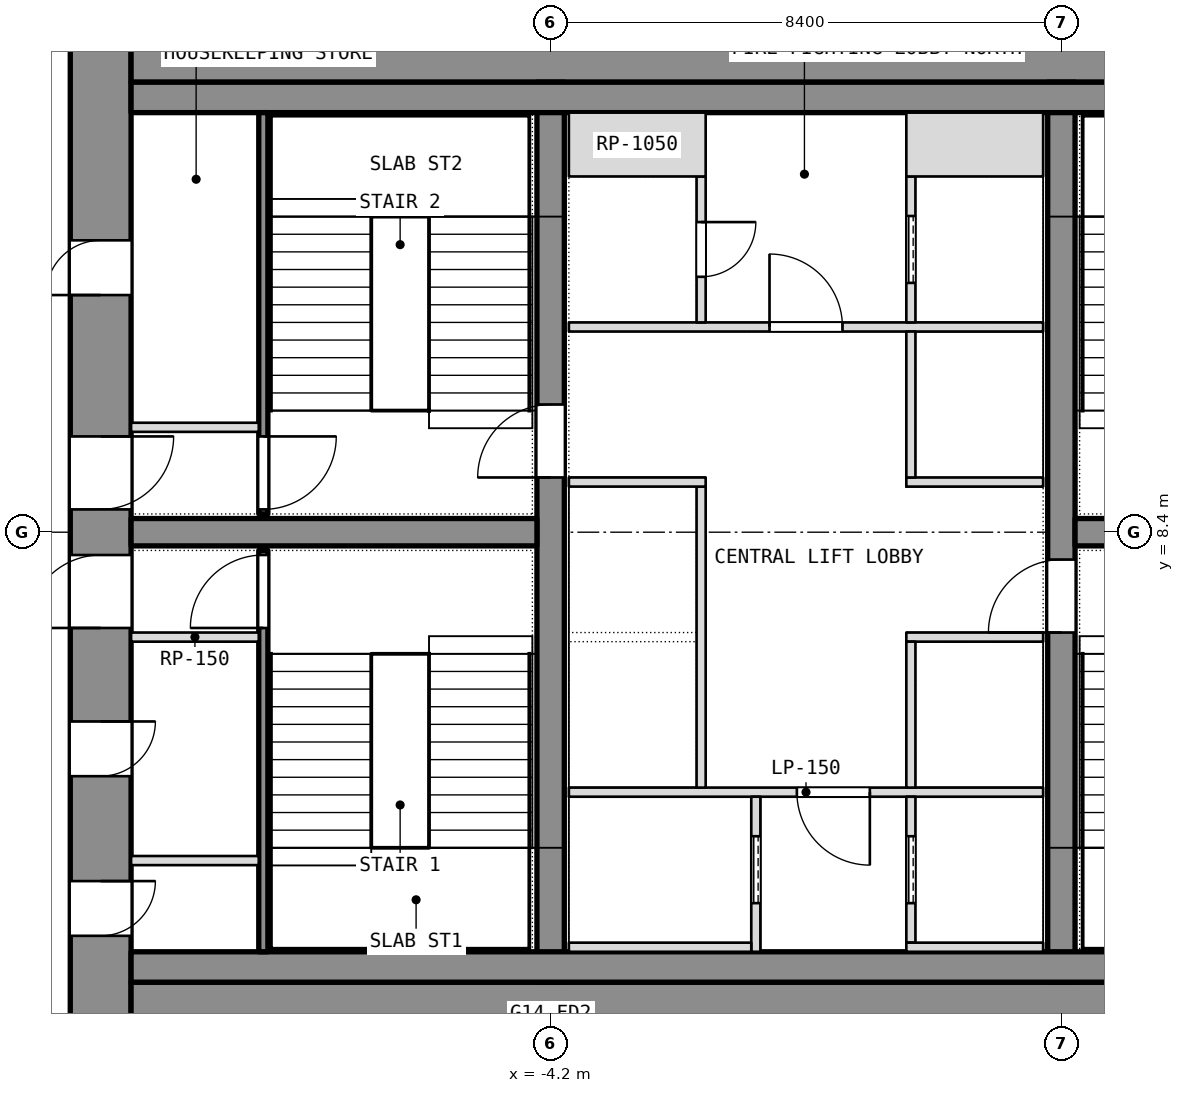
"""IFC4 building model, lengths in metres.
Left out: names, types, materials, properties, quantities, classifications, styles, units other than length and angle.
Written with IfcOpenShell. Run it as: python <this file> out.ifc"""

import sys

from ifc_helpers import new_model, si_unit, direction, frame, frame_2d, origin, place, context, subcontext, project, spatial, rectangle, extrude, element, fill, save


model = new_model("IFC4")
c1 = context("Model", 3, precision=1e-05, world=origin(), true_north=direction((0.0, 1.0)))
c2 = subcontext(c1, "Body", "Model", "MODEL_VIEW")
j1 = project(units=[si_unit("LENGTHUNIT", "METRE"), si_unit("PLANEANGLEUNIT", "RADIAN")], contexts=[c1])
p1 = place(None, origin())
s1 = spatial("IfcSite", under=j1, at=p1, CompositionType="ELEMENT")
p2 = place(p1, origin())
s2 = spatial("IfcBuilding", under=s1, at=p2, CompositionType="ELEMENT")
p3 = place(p2, frame((0.0, 0.0, 158.9)))
s3 = spatial("IfcBuildingStorey", under=s2, at=p3, CompositionType="ELEMENT", Elevation=158.9)
p4 = place(p3, frame((-11.6, 0.0, 0.0), z_axis=(0.0, 0.0, 1.0), x_axis=(0.0, 1.0, 0.0)))
e1 = element("IfcWall", 1, at=p4, inside=s3, PredefinedType="SHEAR", context=c2, shape_type="SweptSolid", body=[
    extrude(rectangle(XDim=16.8, YDim=1.0, at=frame_2d((8.4, 0.0))), origin(), (0.0, 0.0, 1.0), 3.6),
])
p5 = place(p4, frame((1.762, 0.0, 0.0)))
e2 = element("IfcOpeningElement", 2, at=p5, cuts=e1, PredefinedType="OPENING", context=c2, shape_type="SweptSolid", body=[
    extrude(rectangle(XDim=0.9, YDim=2.1, at=frame_2d((0.45, 1.05))), frame((0.0, 0.5, 0.0), z_axis=(0.0, -1.0, 0.0), x_axis=(1.0, 0.0, 0.0)), (0.0, 0.0, 1.0), 1.0),
])
p6 = place(p4, frame((4.387, 0.0, 0.0)))
e3 = element("IfcOpeningElement", 3, at=p6, cuts=e1, PredefinedType="OPENING", context=c2, shape_type="SweptSolid", body=[
    extrude(rectangle(XDim=0.9, YDim=2.1, at=frame_2d((0.45, 1.05))), frame((0.0, 0.5, 0.0), z_axis=(0.0, -1.0, 0.0), x_axis=(1.0, 0.0, 0.0)), (0.0, 0.0, 1.0), 1.0),
])
p7 = place(p4, frame((6.825, 0.0, 0.0)))
e4 = element("IfcOpeningElement", 4, at=p7, cuts=e1, PredefinedType="OPENING", context=c2, shape_type="SweptSolid", body=[
    extrude(rectangle(XDim=1.2, YDim=2.1, at=frame_2d((0.6, 1.05))), frame((0.0, 0.5, 0.0), z_axis=(0.0, -1.0, 0.0), x_axis=(1.0, 0.0, 0.0)), (0.0, 0.0, 1.0), 1.0),
])
p8 = place(p4, frame((12.3, 0.0, 0.0)))
e5 = element("IfcOpeningElement", 5, at=p8, cuts=e1, PredefinedType="OPENING", context=c2, shape_type="SweptSolid", body=[
    extrude(rectangle(XDim=0.9, YDim=2.1, at=frame_2d((0.45, 1.05))), frame((0.0, 0.5, 0.0), z_axis=(0.0, -1.0, 0.0), x_axis=(1.0, 0.0, 0.0)), (0.0, 0.0, 1.0), 1.0),
])
p9 = place(p4, frame((8.775, 0.0, 0.0)))
e6 = element("IfcOpeningElement", 6, at=p9, cuts=e1, PredefinedType="OPENING", context=c2, shape_type="SweptSolid", body=[
    extrude(rectangle(XDim=1.2, YDim=2.1, at=frame_2d((0.6, 1.05))), frame((0.0, 0.5, 0.0), z_axis=(0.0, -1.0, 0.0), x_axis=(1.0, 0.0, 0.0)), (0.0, 0.0, 1.0), 1.0),
])
for number, where, z_axis, x_axis in (
    (7, (-11.1, 0.5, 0.0), (0.0, 0.0, 1.0), (1.0, 0.0, 0.0)),
    (8, (-11.1, 16.3, 0.0), (0.0, 0.0, 1.0), (1.0, 0.0, 0.0)),
):
    element("IfcWall", number, at=place(p3, frame(where, z_axis=z_axis, x_axis=x_axis)), inside=s3, PredefinedType="SHEAR", context=c2, shape_type="SweptSolid", body=[
        extrude(rectangle(XDim=22.2, YDim=1.0, at=frame_2d((11.1, 0.0))), origin(), (0.0, 0.0, 1.0), 3.6),
    ])
p10 = place(p3, frame((-4.2, 1.0, 0.0), z_axis=(0.0, 0.0, 1.0), x_axis=(0.0, 1.0, 0.0)))
e9 = element("IfcWall", 9, at=p10, inside=s3, PredefinedType="SHEAR", context=c2, shape_type="SweptSolid", body=[
    extrude(rectangle(XDim=14.8, YDim=0.45, at=frame_2d((7.4, 0.0))), origin(), (0.0, 0.0, 1.0), 3.6),
])
p11 = place(p10, frame((8.3, 0.0, 0.0)))
e10 = element("IfcOpeningElement", 10, at=p11, cuts=e9, PredefinedType="OPENING", context=c2, shape_type="SweptSolid", body=[
    extrude(rectangle(XDim=1.2, YDim=2.1, at=frame_2d((0.6, 1.05))), frame((0.0, 0.225, 0.0), z_axis=(0.0, -1.0, 0.0), x_axis=(1.0, 0.0, 0.0)), (0.0, 0.0, 1.0), 0.45),
])
p12 = place(p3, frame((4.2, 1.0, 0.0), z_axis=(0.0, 0.0, 1.0), x_axis=(0.0, 1.0, 0.0)))
e11 = element("IfcWall", 11, at=p12, inside=s3, PredefinedType="SHEAR", context=c2, shape_type="SweptSolid", body=[
    extrude(rectangle(XDim=14.8, YDim=0.45, at=frame_2d((7.4, 0.0))), origin(), (0.0, 0.0, 1.0), 3.6),
])
p13 = place(p12, frame((5.75, 0.0, 0.0)))
e12 = element("IfcOpeningElement", 12, at=p13, cuts=e11, PredefinedType="OPENING", context=c2, shape_type="SweptSolid", body=[
    extrude(rectangle(XDim=1.2, YDim=2.1, at=frame_2d((0.6, 1.05))), frame((0.0, 0.225, 0.0), z_axis=(0.0, -1.0, 0.0), x_axis=(1.0, 0.0, 0.0)), (0.0, 0.0, 1.0), 0.45),
])
for number, where, z_axis, x_axis in (
    (13, (-11.1, 8.4, 0.0), (0.0, 0.0, 1.0), (1.0, 0.0, 0.0)),
    (14, (4.425, 8.4, 0.0), (0.0, 0.0, 1.0), (1.0, 0.0, 0.0)),
):
    element("IfcWall", number, at=place(p3, frame(where, z_axis=z_axis, x_axis=x_axis)), inside=s3, PredefinedType="SHEAR", context=c2, shape_type="SweptSolid", body=[
        extrude(rectangle(XDim=6.675, YDim=0.45, at=frame_2d((3.337, 0.0))), origin(), (0.0, 0.0, 1.0), 3.6),
    ])
for number, where, z_axis, x_axis in (
    (15, (-11.1, 1.25, 0.0), (0.0, 0.0, 1.0), (1.0, 0.0, 0.0)),
    (16, (-11.1, 15.55, 0.0), (0.0, 0.0, 1.0), (1.0, 0.0, 0.0)),
):
    element("IfcWall", number, at=place(p3, frame(where, z_axis=z_axis, x_axis=x_axis)), inside=s3, PredefinedType="PARTITIONING", context=c2, shape_type="SweptSolid", body=[
        extrude(rectangle(XDim=22.2, YDim=0.5, at=frame_2d((11.1, 0.0))), origin(), (0.0, 0.0, 1.0), 3.34),
    ])
p14 = place(p3, frame((-8.925, 1.5, 0.0), z_axis=(0.0, 0.0, 1.0), x_axis=(0.0, 1.0, 0.0)))
e17 = element("IfcWall", 17, at=p14, inside=s3, PredefinedType="SHEAR", context=c2, shape_type="SweptSolid", body=[
    extrude(rectangle(XDim=6.6, YDim=0.15, at=frame_2d((3.3, 0.0))), origin(), (0.0, 0.0, 1.0), 3.34),
])
p15 = place(p14, frame((5.325, 0.0, 0.0)))
e18 = element("IfcOpeningElement", 18, at=p15, cuts=e17, PredefinedType="OPENING", context=c2, shape_type="SweptSolid", body=[
    extrude(rectangle(XDim=1.2, YDim=2.1, at=frame_2d((0.6, 1.05))), frame((0.0, 0.075, 0.0), z_axis=(0.0, -1.0, 0.0), x_axis=(1.0, 0.0, 0.0)), (0.0, 0.0, 1.0), 0.15),
])
for number, where, z_axis, x_axis in (
    (19, (-11.1, 6.675, 0.0), (0.0, 0.0, 1.0), (1.0, 0.0, 0.0)),
    (20, (-11.1, 3.0, 0.0), (0.0, 0.0, 1.0), (1.0, 0.0, 0.0)),
):
    element("IfcWall", number, at=place(p3, frame(where, z_axis=z_axis, x_axis=x_axis)), inside=s3, PredefinedType="PARTITIONING", context=c2, shape_type="SweptSolid", body=[
        extrude(rectangle(XDim=2.1, YDim=0.15, at=frame_2d((1.05, 0.0))), origin(), (0.0, 0.0, 1.0), 3.34),
    ])
p16 = place(p3, frame((-8.925, 8.7, 0.0), z_axis=(0.0, 0.0, 1.0), x_axis=(0.0, 1.0, 0.0)))
e21 = element("IfcWall", 21, at=p16, inside=s3, PredefinedType="SHEAR", context=c2, shape_type="SweptSolid", body=[
    extrude(rectangle(XDim=6.6, YDim=0.15, at=frame_2d((3.3, 0.0))), origin(), (0.0, 0.0, 1.0), 3.34),
])
p17 = place(p16, frame((0.075, 0.0, 0.0)))
e22 = element("IfcOpeningElement", 22, at=p17, cuts=e21, PredefinedType="OPENING", context=c2, shape_type="SweptSolid", body=[
    extrude(rectangle(XDim=1.2, YDim=2.1, at=frame_2d((0.6, 1.05))), frame((0.0, 0.075, 0.0), z_axis=(0.0, -1.0, 0.0), x_axis=(1.0, 0.0, 0.0)), (0.0, 0.0, 1.0), 0.15),
])
p18 = place(p3, frame((-11.1, 10.125, 0.0), z_axis=(0.0, 0.0, 1.0), x_axis=(1.0, 0.0, 0.0)))
e23 = element("IfcWall", 23, at=p18, inside=s3, PredefinedType="PARTITIONING", context=c2, shape_type="SweptSolid", body=[
    extrude(rectangle(XDim=2.1, YDim=0.15, at=frame_2d((1.05, 0.0))), origin(), (0.0, 0.0, 1.0), 3.34),
])
p19 = place(p3, frame((-3.9, 4.125, 0.0), z_axis=(0.0, 0.0, 1.0), x_axis=(1.0, 0.0, 0.0)))
e24 = element("IfcWall", 24, at=p19, inside=s3, PredefinedType="PARTITIONING", context=c2, shape_type="SweptSolid", body=[
    extrude(rectangle(XDim=7.8, YDim=0.15, at=frame_2d((3.9, 0.0))), origin(), (0.0, 0.0, 1.0), 3.34),
])
p20 = place(p19, frame((3.75, 0.0, 0.0)))
e25 = element("IfcOpeningElement", 25, at=p20, cuts=e24, PredefinedType="OPENING", context=c2, shape_type="SweptSolid", body=[
    extrude(rectangle(XDim=1.2, YDim=2.1, at=frame_2d((0.6, 1.05))), frame((0.0, 0.075, 0.0), z_axis=(0.0, -1.0, 0.0), x_axis=(1.0, 0.0, 0.0)), (0.0, 0.0, 1.0), 0.15),
])
p21 = place(p3, frame((-3.9, 11.775, 0.0), z_axis=(0.0, 0.0, 1.0), x_axis=(1.0, 0.0, 0.0)))
e26 = element("IfcWall", 26, at=p21, inside=s3, PredefinedType="PARTITIONING", context=c2, shape_type="SweptSolid", body=[
    extrude(rectangle(XDim=7.8, YDim=0.15, at=frame_2d((3.9, 0.0))), origin(), (0.0, 0.0, 1.0), 3.34),
])
p22 = place(p21, frame((3.3, 0.0, 0.0)))
e27 = element("IfcOpeningElement", 27, at=p22, cuts=e26, PredefinedType="OPENING", context=c2, shape_type="SweptSolid", body=[
    extrude(rectangle(XDim=1.2, YDim=2.1, at=frame_2d((0.6, 1.05))), frame((0.0, 0.075, 0.0), z_axis=(0.0, -1.0, 0.0), x_axis=(1.0, 0.0, 0.0)), (0.0, 0.0, 1.0), 0.15),
])
p23 = place(p3, frame((-0.825, 1.5, 0.0), z_axis=(0.0, 0.0, 1.0), x_axis=(0.0, 1.0, 0.0)))
e28 = element("IfcWall", 28, at=p23, inside=s3, PredefinedType="SHEAR", context=c2, shape_type="SweptSolid", body=[
    extrude(rectangle(XDim=2.55, YDim=0.15, at=frame_2d((1.275, 0.0))), origin(), (0.0, 0.0, 1.0), 3.6),
])
p24 = place(p23, frame((0.8, 0.0, 0.0)))
e29 = element("IfcOpeningElement", 29, at=p24, cuts=e28, PredefinedType="OPENING", context=c2, shape_type="SweptSolid", body=[
    extrude(rectangle(XDim=1.1, YDim=2.1, at=frame_2d((0.55, 1.05))), frame((0.0, 0.075, 0.0), z_axis=(0.0, -1.0, 0.0), x_axis=(1.0, 0.0, 0.0)), (0.0, 0.0, 1.0), 0.15),
])
p25 = place(p3, frame((-3.9, 1.575, 0.0), z_axis=(0.0, 0.0, 1.0), x_axis=(1.0, 0.0, 0.0)))
e30 = element("IfcWall", 30, at=p25, inside=s3, PredefinedType="SHEAR", context=c2, shape_type="SweptSolid", body=[
    extrude(rectangle(XDim=3.0, YDim=0.15, at=frame_2d((1.5, 0.0))), origin(), (0.0, 0.0, 1.0), 3.6),
])
p26 = place(p3, frame((-1.725, 4.2, 0.0), z_axis=(0.0, 0.0, 1.0), x_axis=(0.0, 1.0, 0.0)))
e31 = element("IfcWall", 31, at=p26, inside=s3, PredefinedType="SHEAR", context=c2, shape_type="SweptSolid", body=[
    extrude(rectangle(XDim=4.95, YDim=0.15, at=frame_2d((2.475, 0.0))), origin(), (0.0, 0.0, 1.0), 3.6),
])
p27 = place(p3, frame((-3.9, 9.225, 0.0), z_axis=(0.0, 0.0, 1.0), x_axis=(1.0, 0.0, 0.0)))
e32 = element("IfcWall", 32, at=p27, inside=s3, PredefinedType="SHEAR", context=c2, shape_type="SweptSolid", body=[
    extrude(rectangle(XDim=2.25, YDim=0.15, at=frame_2d((1.125, 0.0))), origin(), (0.0, 0.0, 1.0), 3.6),
])
p28 = place(p3, frame((-1.725, 11.85, 0.0), z_axis=(0.0, 0.0, 1.0), x_axis=(0.0, 1.0, 0.0)))
e33 = element("IfcWall", 33, at=p28, inside=s3, PredefinedType="PARTITIONING", context=c2, shape_type="SweptSolid", body=[
    extrude(rectangle(XDim=2.4, YDim=0.15, at=frame_2d((1.2, 0.0))), origin(), (0.0, 0.0, 1.0), 3.34),
])
p29 = place(p28, frame((0.75, 0.0, 0.0)))
e34 = element("IfcOpeningElement", 34, at=p29, cuts=e33, PredefinedType="OPENING", context=c2, shape_type="SweptSolid", body=[
    extrude(rectangle(XDim=0.9, YDim=2.1, at=frame_2d((0.45, 1.05))), frame((0.0, 0.075, 0.0), z_axis=(0.0, -1.0, 0.0), x_axis=(1.0, 0.0, 0.0)), (0.0, 0.0, 1.0), 0.15),
])
p30 = place(p3, frame((-3.9, 14.775, 0.0), z_axis=(0.0, 0.0, 1.0), x_axis=(1.0, 0.0, 0.0)))
e35 = element("IfcWall", 35, at=p30, inside=s3, PredefinedType="PARTITIONING", context=c2, shape_type="SweptSolid", body=[
    extrude(rectangle(XDim=2.25, YDim=1.05, at=frame_2d((1.125, 0.0))), origin(), (0.0, 0.0, 1.0), 3.34),
])
p31 = place(p3, frame((1.725, 1.65, 0.0), z_axis=(0.0, 0.0, 1.0), x_axis=(0.0, 1.0, 0.0)))
e36 = element("IfcWall", 36, at=p31, inside=s3, PredefinedType="SHEAR", context=c2, shape_type="SweptSolid", body=[
    extrude(rectangle(XDim=2.4, YDim=0.15, at=frame_2d((1.2, 0.0))), origin(), (0.0, 0.0, 1.0), 3.6),
])
p32 = place(p31, frame((0.65, 0.0, 0.0)))
e37 = element("IfcOpeningElement", 37, at=p32, cuts=e36, PredefinedType="OPENING", context=c2, shape_type="SweptSolid", body=[
    extrude(rectangle(XDim=1.1, YDim=2.1, at=frame_2d((0.55, 1.05))), frame((0.0, 0.075, 0.0), z_axis=(0.0, -1.0, 0.0), x_axis=(1.0, 0.0, 0.0)), (0.0, 0.0, 1.0), 0.15),
])
p33 = place(p3, frame((1.65, 1.575, 0.0), z_axis=(0.0, 0.0, 1.0), x_axis=(1.0, 0.0, 0.0)))
e38 = element("IfcWall", 38, at=p33, inside=s3, PredefinedType="SHEAR", context=c2, shape_type="SweptSolid", body=[
    extrude(rectangle(XDim=2.25, YDim=0.15, at=frame_2d((1.125, 0.0))), origin(), (0.0, 0.0, 1.0), 3.6),
])
p34 = place(p3, frame((1.725, 11.85, 0.0), z_axis=(0.0, 0.0, 1.0), x_axis=(0.0, 1.0, 0.0)))
e39 = element("IfcWall", 39, at=p34, inside=s3, PredefinedType="SHEAR", context=c2, shape_type="SweptSolid", body=[
    extrude(rectangle(XDim=2.4, YDim=0.15, at=frame_2d((1.2, 0.0))), origin(), (0.0, 0.0, 1.0), 3.6),
])
p35 = place(p34, frame((0.65, 0.0, 0.0)))
e40 = element("IfcOpeningElement", 40, at=p35, cuts=e39, PredefinedType="OPENING", context=c2, shape_type="SweptSolid", body=[
    extrude(rectangle(XDim=1.1, YDim=2.1, at=frame_2d((0.55, 1.05))), frame((0.0, 0.075, 0.0), z_axis=(0.0, -1.0, 0.0), x_axis=(1.0, 0.0, 0.0)), (0.0, 0.0, 1.0), 0.15),
])
p36 = place(p3, frame((1.65, 14.775, 0.0), z_axis=(0.0, 0.0, 1.0), x_axis=(1.0, 0.0, 0.0)))
e41 = element("IfcWall", 41, at=p36, inside=s3, PredefinedType="SHEAR", context=c2, shape_type="SweptSolid", body=[
    extrude(rectangle(XDim=2.25, YDim=1.05, at=frame_2d((1.125, 0.0))), origin(), (0.0, 0.0, 1.0), 3.6),
])
for number, where, z_axis, x_axis in (
    (42, (1.65, 6.675, 0.0), (0.0, 0.0, 1.0), (1.0, 0.0, 0.0)),
    (43, (1.65, 9.225, 0.0), (0.0, 0.0, 1.0), (1.0, 0.0, 0.0)),
):
    element("IfcWall", number, at=place(p3, frame(where, z_axis=z_axis, x_axis=x_axis)), inside=s3, PredefinedType="SHEAR", context=c2, shape_type="SweptSolid", body=[
        extrude(rectangle(XDim=2.25, YDim=0.15, at=frame_2d((1.125, 0.0))), origin(), (0.0, 0.0, 1.0), 3.6),
    ])
p37 = place(p3, frame((1.725, 4.2, 0.0), z_axis=(0.0, 0.0, 1.0), x_axis=(0.0, 1.0, 0.0)))
e44 = element("IfcWall", 44, at=p37, inside=s3, PredefinedType="SHEAR", context=c2, shape_type="SweptSolid", body=[
    extrude(rectangle(XDim=2.4, YDim=0.15, at=frame_2d((1.2, 0.0))), origin(), (0.0, 0.0, 1.0), 3.6),
])
p38 = place(p3, frame((1.725, 9.3, 0.0), z_axis=(0.0, 0.0, 1.0), x_axis=(0.0, 1.0, 0.0)))
e45 = element("IfcWall", 45, at=p38, inside=s3, PredefinedType="SHEAR", context=c2, shape_type="SweptSolid", body=[
    extrude(rectangle(XDim=2.4, YDim=0.15, at=frame_2d((1.2, 0.0))), origin(), (0.0, 0.0, 1.0), 3.6),
])
p39 = place(p5, origin())
e46 = element("IfcDoor", 46, at=p39, inside=s3, OperationType="SINGLE_SWING_LEFT", PredefinedType="DOOR", context=c2, shape_type="SweptSolid", body=[
    extrude(rectangle(XDim=0.9, YDim=2.1, at=frame_2d((0.45, 1.05))), frame((0.0, 0.025, 0.0), z_axis=(0.0, -1.0, 0.0), x_axis=(1.0, 0.0, 0.0)), (0.0, 0.0, 1.0), 0.05),
])
fill(e2, e46)
p40 = place(p6, origin())
e47 = element("IfcDoor", 47, at=p40, inside=s3, OperationType="SINGLE_SWING_LEFT", PredefinedType="DOOR", context=c2, shape_type="SweptSolid", body=[
    extrude(rectangle(XDim=0.9, YDim=2.1, at=frame_2d((0.45, 1.05))), frame((0.0, 0.025, 0.0), z_axis=(0.0, -1.0, 0.0), x_axis=(1.0, 0.0, 0.0)), (0.0, 0.0, 1.0), 0.05),
])
fill(e3, e47)
p41 = place(p7, origin())
e48 = element("IfcDoor", 48, at=p41, inside=s3, OperationType="SINGLE_SWING_LEFT", PredefinedType="DOOR", context=c2, shape_type="SweptSolid", body=[
    extrude(rectangle(XDim=1.2, YDim=2.1, at=frame_2d((0.6, 1.05))), frame((0.0, 0.025, 0.0), z_axis=(0.0, -1.0, 0.0), x_axis=(1.0, 0.0, 0.0)), (0.0, 0.0, 1.0), 0.05),
])
fill(e4, e48)
p42 = place(p15, origin())
e49 = element("IfcDoor", 49, at=p42, inside=s3, OperationType="SINGLE_SWING_LEFT", PredefinedType="DOOR", context=c2, shape_type="SweptSolid", body=[
    extrude(rectangle(XDim=1.2, YDim=2.1, at=frame_2d((0.6, 1.05))), frame((0.0, 0.025, 0.0), z_axis=(0.0, -1.0, 0.0), x_axis=(1.0, 0.0, 0.0)), (0.0, 0.0, 1.0), 0.05),
])
fill(e18, e49)
p43 = place(p8, origin())
e50 = element("IfcDoor", 50, at=p43, inside=s3, OperationType="SINGLE_SWING_LEFT", PredefinedType="DOOR", context=c2, shape_type="SweptSolid", body=[
    extrude(rectangle(XDim=0.9, YDim=2.1, at=frame_2d((0.45, 1.05))), frame((0.0, 0.025, 0.0), z_axis=(0.0, -1.0, 0.0), x_axis=(1.0, 0.0, 0.0)), (0.0, 0.0, 1.0), 0.05),
])
fill(e5, e50)
p44 = place(p9, origin())
e51 = element("IfcDoor", 51, at=p44, inside=s3, OperationType="SINGLE_SWING_LEFT", PredefinedType="DOOR", context=c2, shape_type="SweptSolid", body=[
    extrude(rectangle(XDim=1.2, YDim=2.1, at=frame_2d((0.6, 1.05))), frame((0.0, 0.025, 0.0), z_axis=(0.0, -1.0, 0.0), x_axis=(1.0, 0.0, 0.0)), (0.0, 0.0, 1.0), 0.05),
])
fill(e6, e51)
p45 = place(p17, origin())
e52 = element("IfcDoor", 52, at=p45, inside=s3, OperationType="SINGLE_SWING_LEFT", PredefinedType="DOOR", context=c2, shape_type="SweptSolid", body=[
    extrude(rectangle(XDim=1.2, YDim=2.1, at=frame_2d((0.6, 1.05))), frame((0.0, 0.025, 0.0), z_axis=(0.0, -1.0, 0.0), x_axis=(1.0, 0.0, 0.0)), (0.0, 0.0, 1.0), 0.05),
])
fill(e22, e52)
p46 = place(p24, origin())
e53 = element("IfcDoor", 53, at=p46, inside=s3, OperationType="SLIDING_TO_LEFT", PredefinedType="DOOR", context=c2, shape_type="SweptSolid", body=[
    extrude(rectangle(XDim=1.1, YDim=2.1, at=frame_2d((0.55, 1.05))), frame((0.0, 0.025, 0.0), z_axis=(0.0, -1.0, 0.0), x_axis=(1.0, 0.0, 0.0)), (0.0, 0.0, 1.0), 0.05),
])
fill(e29, e53)
p47 = place(p32, origin())
e54 = element("IfcDoor", 54, at=p47, inside=s3, OperationType="SLIDING_TO_LEFT", PredefinedType="DOOR", context=c2, shape_type="SweptSolid", body=[
    extrude(rectangle(XDim=1.1, YDim=2.1, at=frame_2d((0.55, 1.05))), frame((0.0, 0.025, 0.0), z_axis=(0.0, -1.0, 0.0), x_axis=(1.0, 0.0, 0.0)), (0.0, 0.0, 1.0), 0.05),
])
fill(e37, e54)
p48 = place(p35, origin())
e55 = element("IfcDoor", 55, at=p48, inside=s3, OperationType="SLIDING_TO_LEFT", PredefinedType="DOOR", context=c2, shape_type="SweptSolid", body=[
    extrude(rectangle(XDim=1.1, YDim=2.1, at=frame_2d((0.55, 1.05))), frame((0.0, 0.025, 0.0), z_axis=(0.0, -1.0, 0.0), x_axis=(1.0, 0.0, 0.0)), (0.0, 0.0, 1.0), 0.05),
])
fill(e40, e55)
p49 = place(p20, origin())
e56 = element("IfcDoor", 56, at=p49, inside=s3, OperationType="SINGLE_SWING_LEFT", PredefinedType="DOOR", context=c2, shape_type="SweptSolid", body=[
    extrude(rectangle(XDim=1.2, YDim=2.1, at=frame_2d((0.6, 1.05))), frame((0.0, 0.025, 0.0), z_axis=(0.0, -1.0, 0.0), x_axis=(1.0, 0.0, 0.0)), (0.0, 0.0, 1.0), 0.05),
])
fill(e25, e56)
p50 = place(p22, origin())
e57 = element("IfcDoor", 57, at=p50, inside=s3, OperationType="SINGLE_SWING_LEFT", PredefinedType="DOOR", context=c2, shape_type="SweptSolid", body=[
    extrude(rectangle(XDim=1.2, YDim=2.1, at=frame_2d((0.6, 1.05))), frame((0.0, 0.025, 0.0), z_axis=(0.0, -1.0, 0.0), x_axis=(1.0, 0.0, 0.0)), (0.0, 0.0, 1.0), 0.05),
])
fill(e27, e57)
p51 = place(p29, origin())
e58 = element("IfcDoor", 58, at=p51, inside=s3, OperationType="SINGLE_SWING_LEFT", PredefinedType="DOOR", context=c2, shape_type="SweptSolid", body=[
    extrude(rectangle(XDim=0.9, YDim=2.1, at=frame_2d((0.45, 1.05))), frame((0.0, 0.025, 0.0), z_axis=(0.0, -1.0, 0.0), x_axis=(1.0, 0.0, 0.0)), (0.0, 0.0, 1.0), 0.05),
])
fill(e34, e58)
p52 = place(p11, origin())
e59 = element("IfcDoor", 59, at=p52, inside=s3, OperationType="SINGLE_SWING_LEFT", PredefinedType="DOOR", context=c2, shape_type="SweptSolid", body=[
    extrude(rectangle(XDim=1.2, YDim=2.1, at=frame_2d((0.6, 1.05))), frame((0.0, 0.025, 0.0), z_axis=(0.0, -1.0, 0.0), x_axis=(1.0, 0.0, 0.0)), (0.0, 0.0, 1.0), 0.05),
])
fill(e10, e59)
p53 = place(p13, origin())
e60 = element("IfcDoor", 60, at=p53, inside=s3, OperationType="SINGLE_SWING_LEFT", PredefinedType="DOOR", context=c2, shape_type="SweptSolid", body=[
    extrude(rectangle(XDim=1.2, YDim=2.1, at=frame_2d((0.6, 1.05))), frame((0.0, 0.025, 0.0), z_axis=(0.0, -1.0, 0.0), x_axis=(1.0, 0.0, 0.0)), (0.0, 0.0, 1.0), 0.05),
])
fill(e12, e60)
save(model, sys.argv[1])
